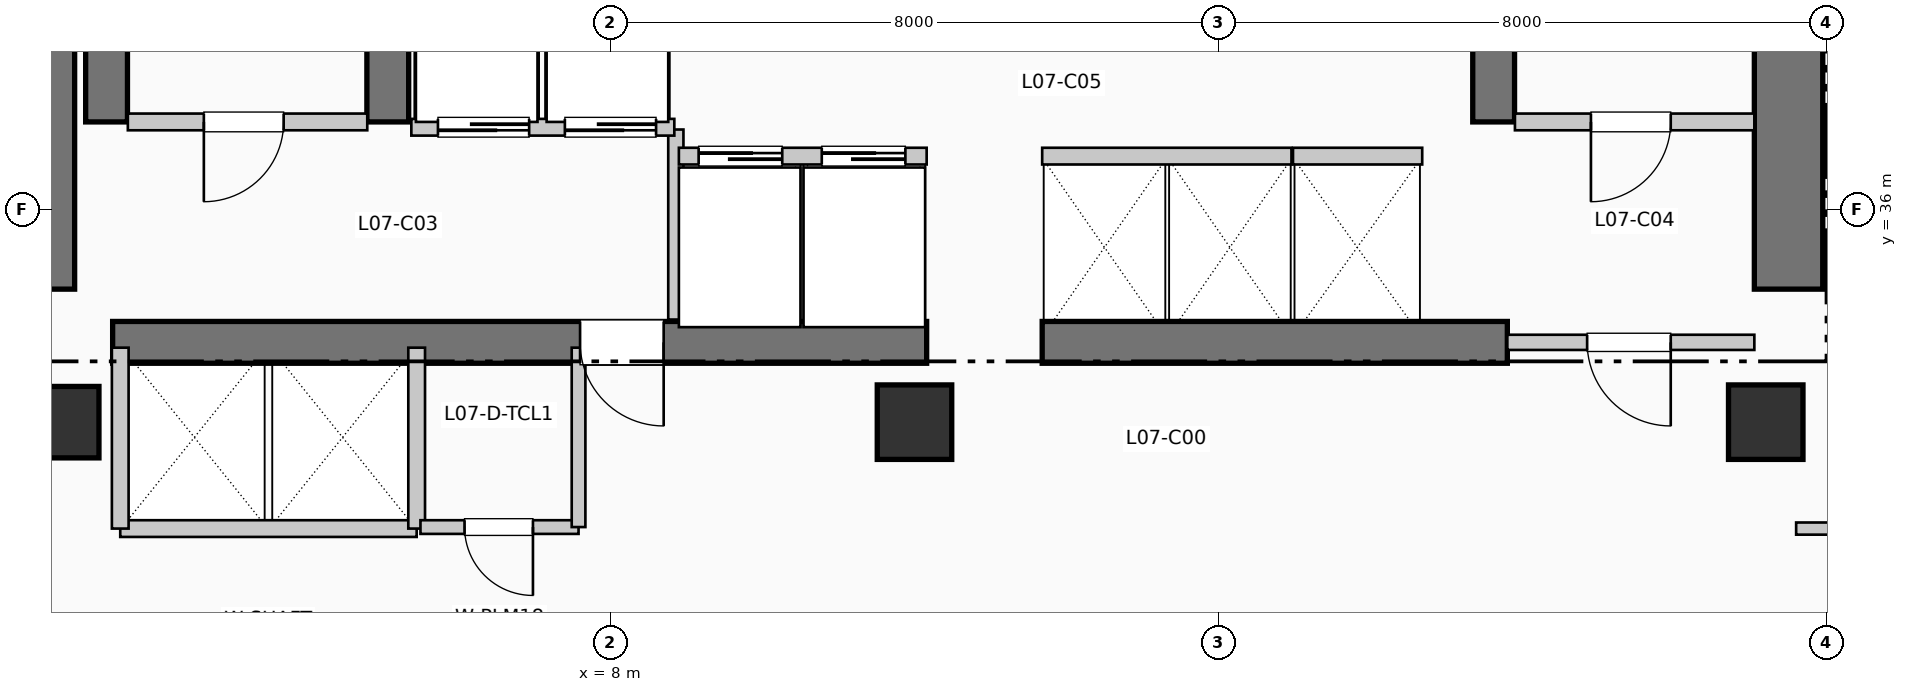
"""IFC4 building model, lengths in metres.
Left out: names, types, materials, properties, quantities, classifications, styles, units other than length and angle.
Written with IfcOpenShell. Run it as: python <this file> out.ifc"""

import sys

from ifc_helpers import new_model, si_unit, direction, frame, frame_2d, origin, origin_2d, place, context, subcontext, project, spatial, rectangle, extrude, element, fill, save


model = new_model("IFC4")
c1 = context("Model", 3, precision=1e-05, world=origin(), true_north=direction((0.0, 1.0)))
c2 = subcontext(c1, "Body", "Model", "MODEL_VIEW")
j1 = project(units=[si_unit("LENGTHUNIT", "METRE"), si_unit("PLANEANGLEUNIT", "RADIAN")], contexts=[c1])
p1 = place(None, origin())
s1 = spatial("IfcSite", under=j1, at=p1, CompositionType="ELEMENT")
p2 = place(p1, origin())
s2 = spatial("IfcBuilding", under=s1, at=p2, CompositionType="ELEMENT")
p3 = place(p2, frame((0.0, 0.0, 34.32)))
s3 = spatial("IfcBuildingStorey", under=s2, at=p3, CompositionType="ELEMENT", Elevation=34.32)
p4 = place(p3, frame((0.5, 34.95, 0.0), z_axis=(0.0, 0.0, 1.0), x_axis=(0.0, 1.0, 0.0)))
e1 = element("IfcWall", 1, at=p4, inside=s3, PredefinedType="SHEAR", context=c2, shape_type="SweptSolid", body=[
    extrude(rectangle(XDim=7.9, YDim=0.9, at=frame_2d((3.95, 0.0))), origin(), (0.0, 0.0, 1.0), 3.96),
])
p5 = place(p3, frame((23.5, 34.95, 0.0), z_axis=(0.0, 0.0, 1.0), x_axis=(0.0, 1.0, 0.0)))
e2 = element("IfcWall", 2, at=p5, inside=s3, PredefinedType="SHEAR", context=c2, shape_type="SweptSolid", body=[
    extrude(rectangle(XDim=10.64, YDim=0.9, at=frame_2d((5.32, 0.0))), origin(), (0.0, 0.0, 1.0), 3.96),
])
p6 = place(p3, frame((1.45, 34.25, 0.0), z_axis=(0.0, 0.0, 1.0), x_axis=(1.0, 0.0, 0.0)))
e3 = element("IfcWall", 3, at=p6, inside=s3, PredefinedType="SHEAR", context=c2, shape_type="SweptSolid", body=[
    extrude(rectangle(XDim=10.71, YDim=0.55, at=frame_2d((5.355, 0.0))), origin(), (0.0, 0.0, 1.0), 3.96),
])
p7 = place(p6, frame((7.25, 0.0, 0.0), z_axis=(0.0, 0.0, 1.0), x_axis=(-1.0, 0.0, 0.0)))
e4 = element("IfcOpeningElement", 4, at=p7, cuts=e3, PredefinedType="OPENING", context=c2, shape_type="SweptSolid", body=[
    extrude(rectangle(XDim=1.1, YDim=2.15, at=frame_2d((0.55, 1.075))), frame((0.0, 0.285, 0.0), z_axis=(0.0, -1.0, 0.0), x_axis=(1.0, 0.0, 0.0)), (0.0, 0.0, 1.0), 0.57),
])
p8 = place(p3, frame((13.68, 34.25, 0.0), z_axis=(0.0, 0.0, 1.0), x_axis=(1.0, 0.0, 0.0)))
e5 = element("IfcWall", 5, at=p8, inside=s3, PredefinedType="SHEAR", context=c2, shape_type="SweptSolid", body=[
    extrude(rectangle(XDim=6.12, YDim=0.55, at=frame_2d((3.06, 0.0))), origin(), (0.0, 0.0, 1.0), 3.96),
])
for number, where, z_axis, x_axis in (
    (6, (1.37, 37.15, 0.0), (0.0, 0.0, 1.0), (0.0, 1.0, 0.0)),
    (7, (5.07, 37.15, 0.0), (0.0, 0.0, 1.0), (0.0, 1.0, 0.0)),
    (8, (19.62, 37.15, 0.0), (0.0, 0.0, 1.0), (0.0, 1.0, 0.0)),
):
    element("IfcWall", number, at=place(p3, frame(where, z_axis=z_axis, x_axis=x_axis)), inside=s3, PredefinedType="SHEAR", context=c2, shape_type="SweptSolid", body=[
        extrude(rectangle(XDim=7.89, YDim=0.55, at=frame_2d((3.945, 0.0))), origin(), (0.0, 0.0, 1.0), 3.96),
    ])
p9 = place(p3, frame((0.8, 33.2, 0.0), z_axis=(0.0, 0.0, 1.0), x_axis=(1.0, 0.0, 0.0)))
e9 = element("IfcColumn", 9, at=p9, inside=s3, PredefinedType="COLUMN", context=c2, shape_type="SweptSolid", body=[
    extrude(rectangle(XDim=0.94, YDim=0.94, at=origin_2d()), origin(), (0.0, 0.0, 1.0), 3.96),
])
for number, where, z_axis, x_axis in (
    (10, (12.0, 33.2, 0.0), (0.0, 0.0, 1.0), (1.0, 0.0, 0.0)),
    (11, (23.2, 33.2, 0.0), (0.0, 0.0, 1.0), (1.0, 0.0, 0.0)),
):
    element("IfcColumn", number, at=place(p3, frame(where, z_axis=z_axis, x_axis=x_axis)), inside=s3, PredefinedType="COLUMN", context=c2, shape_type="SweptSolid", body=[
        extrude(rectangle(XDim=0.98, YDim=0.98, at=origin_2d()), origin(), (0.0, 0.0, 1.0), 3.96),
    ])
p10 = place(p3, frame((1.65, 37.15, 0.0), z_axis=(0.0, 0.0, 1.0), x_axis=(1.0, 0.0, 0.0)))
e12 = element("IfcWall", 12, at=p10, inside=s3, PredefinedType="PARTITIONING", context=c2, shape_type="SweptSolid", body=[
    extrude(rectangle(XDim=3.15, YDim=0.22, at=frame_2d((1.575, 0.0))), origin(), (0.0, 0.0, 1.0), 3.71),
])
p11 = place(p10, frame((2.05, 0.0, 0.0), z_axis=(0.0, 0.0, 1.0), x_axis=(-1.0, 0.0, 0.0)))
e13 = element("IfcOpeningElement", 13, at=p11, cuts=e12, PredefinedType="OPENING", context=c2, shape_type="SweptSolid", body=[
    extrude(rectangle(XDim=1.05, YDim=2.15, at=frame_2d((0.525, 1.075))), frame((0.0, 0.12, 0.0), z_axis=(0.0, -1.0, 0.0), x_axis=(1.0, 0.0, 0.0)), (0.0, 0.0, 1.0), 0.24),
])
p12 = place(p3, frame((8.86, 34.55, 0.0), z_axis=(0.0, 0.0, 1.0), x_axis=(0.0, 1.0, 0.0)))
e14 = element("IfcWall", 14, at=p12, inside=s3, PredefinedType="PARTITIONING", context=c2, shape_type="SweptSolid", body=[
    extrude(rectangle(XDim=2.5, YDim=0.2, at=frame_2d((1.25, 0.0))), origin(), (0.0, 0.0, 1.0), 3.71),
])
p13 = place(p3, frame((19.9, 37.15, 0.0), z_axis=(0.0, 0.0, 1.0), x_axis=(1.0, 0.0, 0.0)))
e15 = element("IfcWall", 15, at=p13, inside=s3, PredefinedType="PARTITIONING", context=c2, shape_type="SweptSolid", body=[
    extrude(rectangle(XDim=3.15, YDim=0.22, at=frame_2d((1.575, 0.0))), origin(), (0.0, 0.0, 1.0), 3.71),
])
p14 = place(p13, frame((2.05, 0.0, 0.0), z_axis=(0.0, 0.0, 1.0), x_axis=(-1.0, 0.0, 0.0)))
e16 = element("IfcOpeningElement", 16, at=p14, cuts=e15, PredefinedType="OPENING", context=c2, shape_type="SweptSolid", body=[
    extrude(rectangle(XDim=1.05, YDim=2.15, at=frame_2d((0.525, 1.075))), frame((0.0, 0.12, 0.0), z_axis=(0.0, -1.0, 0.0), x_axis=(1.0, 0.0, 0.0)), (0.0, 0.0, 1.0), 0.24),
])
p15 = place(p3, frame((19.8, 34.25, 0.0), z_axis=(0.0, 0.0, 1.0), x_axis=(1.0, 0.0, 0.0)))
e17 = element("IfcWall", 17, at=p15, inside=s3, PredefinedType="PARTITIONING", context=c2, shape_type="SweptSolid", body=[
    extrude(rectangle(XDim=3.25, YDim=0.2, at=frame_2d((1.625, 0.0))), origin(), (0.0, 0.0, 1.0), 3.71),
])
p16 = place(p15, frame((2.15, 0.0, 0.0), z_axis=(0.0, 0.0, 1.0), x_axis=(-1.0, 0.0, 0.0)))
e18 = element("IfcOpeningElement", 18, at=p16, cuts=e17, PredefinedType="OPENING", context=c2, shape_type="SweptSolid", body=[
    extrude(rectangle(XDim=1.1, YDim=2.15, at=frame_2d((0.55, 1.075))), frame((0.0, 0.11, 0.0), z_axis=(0.0, -1.0, 0.0), x_axis=(1.0, 0.0, 0.0)), (0.0, 0.0, 1.0), 0.22),
])
p17 = place(p3, frame((5.38, 37.08, 0.0), z_axis=(0.0, 0.0, 1.0), x_axis=(1.0, 0.0, 0.0)))
e19 = element("IfcWall", 19, at=p17, inside=s3, PredefinedType="PARTITIONING", context=c2, shape_type="SweptSolid", body=[
    extrude(rectangle(XDim=3.46, YDim=0.22, at=frame_2d((1.73, 0.0))), origin(), (0.0, 0.0, 1.0), 3.71),
])
p18 = place(p17, frame((1.55, 0.0, 0.0), z_axis=(0.0, 0.0, 1.0), x_axis=(-1.0, 0.0, 0.0)))
e20 = element("IfcOpeningElement", 20, at=p18, cuts=e19, PredefinedType="OPENING", context=c2, shape_type="SweptSolid", body=[
    extrude(rectangle(XDim=1.2, YDim=2.2, at=frame_2d((0.6, 1.1))), frame((0.0, 0.12, 0.0), z_axis=(0.0, -1.0, 0.0), x_axis=(1.0, 0.0, 0.0)), (0.0, 0.0, 1.0), 0.24),
])
p19 = place(p17, frame((3.22, 0.0, 0.0), z_axis=(0.0, 0.0, 1.0), x_axis=(-1.0, 0.0, 0.0)))
e21 = element("IfcOpeningElement", 21, at=p19, cuts=e19, PredefinedType="OPENING", context=c2, shape_type="SweptSolid", body=[
    extrude(rectangle(XDim=1.2, YDim=2.2, at=frame_2d((0.6, 1.1))), frame((0.0, 0.12, 0.0), z_axis=(0.0, -1.0, 0.0), x_axis=(1.0, 0.0, 0.0)), (0.0, 0.0, 1.0), 0.24),
])
p20 = place(p3, frame((1.55, 31.8, 0.0), z_axis=(0.0, 0.0, 1.0), x_axis=(1.0, 0.0, 0.0)))
e22 = element("IfcWall", 22, at=p20, inside=s3, PredefinedType="PARTITIONING", context=c2, shape_type="SweptSolid", body=[
    extrude(rectangle(XDim=3.9, YDim=0.22, at=frame_2d((1.95, 0.0))), origin(), (0.0, 0.0, 1.0), 3.71),
])
for number, where, z_axis, x_axis in (
    (23, (1.55, 31.8, 0.0), (0.0, 0.0, 1.0), (0.0, 1.0, 0.0)),
    (24, (5.45, 31.8, 0.0), (0.0, 0.0, 1.0), (0.0, 1.0, 0.0)),
):
    element("IfcWall", number, at=place(p3, frame(where, z_axis=z_axis, x_axis=x_axis)), inside=s3, PredefinedType="PARTITIONING", context=c2, shape_type="SweptSolid", body=[
        extrude(rectangle(XDim=2.38, YDim=0.22, at=frame_2d((1.19, 0.0))), origin(), (0.0, 0.0, 1.0), 3.71),
    ])
p21 = place(p3, frame((5.5, 31.82, 0.0), z_axis=(0.0, 0.0, 1.0), x_axis=(1.0, 0.0, 0.0)))
e25 = element("IfcWall", 25, at=p21, inside=s3, PredefinedType="PLUMBINGWALL", context=c2, shape_type="SweptSolid", body=[
    extrude(rectangle(XDim=2.08, YDim=0.18, at=frame_2d((1.04, 0.0))), origin(), (0.0, 0.0, 1.0), 3.71),
])
p22 = place(p21, frame((1.48, 0.0, 0.0), z_axis=(0.0, 0.0, 1.0), x_axis=(-1.0, 0.0, 0.0)))
e26 = element("IfcOpeningElement", 26, at=p22, cuts=e25, PredefinedType="OPENING", context=c2, shape_type="SweptSolid", body=[
    extrude(rectangle(XDim=0.9, YDim=2.1, at=frame_2d((0.45, 1.05))), frame((0.0, 0.1, 0.0), z_axis=(0.0, -1.0, 0.0), x_axis=(1.0, 0.0, 0.0)), (0.0, 0.0, 1.0), 0.2),
])
p23 = place(p3, frame((7.58, 31.82, 0.0), z_axis=(0.0, 0.0, 1.0), x_axis=(0.0, 1.0, 0.0)))
e27 = element("IfcWall", 27, at=p23, inside=s3, PredefinedType="PLUMBINGWALL", context=c2, shape_type="SweptSolid", body=[
    extrude(rectangle(XDim=2.36, YDim=0.18, at=frame_2d((1.18, 0.0))), origin(), (0.0, 0.0, 1.0), 3.71),
])
p24 = place(p3, frame((8.9, 36.7, 0.0), z_axis=(0.0, 0.0, 1.0), x_axis=(1.0, 0.0, 0.0)))
e28 = element("IfcWall", 28, at=p24, inside=s3, PredefinedType="PARTITIONING", context=c2, shape_type="SweptSolid", body=[
    extrude(rectangle(XDim=3.26, YDim=0.22, at=frame_2d((1.63, 0.0))), origin(), (0.0, 0.0, 1.0), 3.71),
])
p25 = place(p24, frame((0.26, 0.0, 0.0)))
e29 = element("IfcOpeningElement", 29, at=p25, cuts=e28, PredefinedType="OPENING", context=c2, shape_type="SweptSolid", body=[
    extrude(rectangle(XDim=1.1, YDim=2.2, at=frame_2d((0.55, 1.1))), frame((0.0, 0.12, 0.0), z_axis=(0.0, -1.0, 0.0), x_axis=(1.0, 0.0, 0.0)), (0.0, 0.0, 1.0), 0.24),
])
p26 = place(p24, frame((1.88, 0.0, 0.0)))
e30 = element("IfcOpeningElement", 30, at=p26, cuts=e28, PredefinedType="OPENING", context=c2, shape_type="SweptSolid", body=[
    extrude(rectangle(XDim=1.1, YDim=2.2, at=frame_2d((0.55, 1.1))), frame((0.0, 0.12, 0.0), z_axis=(0.0, -1.0, 0.0), x_axis=(1.0, 0.0, 0.0)), (0.0, 0.0, 1.0), 0.24),
])
p27 = place(p3, frame((13.68, 36.7, 0.0), z_axis=(0.0, 0.0, 1.0), x_axis=(1.0, 0.0, 0.0)))
e31 = element("IfcWall", 31, at=p27, inside=s3, PredefinedType="PARTITIONING", context=c2, shape_type="SweptSolid", body=[
    extrude(rectangle(XDim=3.28, YDim=0.22, at=frame_2d((1.64, 0.0))), origin(), (0.0, 0.0, 1.0), 3.71),
])
p28 = place(p3, frame((16.98, 36.7, 0.0), z_axis=(0.0, 0.0, 1.0), x_axis=(1.0, 0.0, 0.0)))
e32 = element("IfcWall", 32, at=p28, inside=s3, PredefinedType="PARTITIONING", context=c2, shape_type="SweptSolid", body=[
    extrude(rectangle(XDim=1.7, YDim=0.22, at=frame_2d((0.85, 0.0))), origin(), (0.0, 0.0, 1.0), 3.71),
])
p29 = place(p3, frame((23.6, 31.8, 0.0), z_axis=(0.0, 0.0, 1.0), x_axis=(1.0, 0.0, 0.0)))
e33 = element("IfcWall", 33, at=p29, inside=s3, PredefinedType="PARTITIONING", context=c2, shape_type="SweptSolid", body=[
    extrude(rectangle(XDim=32.21, YDim=0.16, at=frame_2d((16.105, 0.0))), origin(), (0.0, 0.0, 1.0), 3.71),
])
p30 = place(p29, frame((8.577, 0.0, 0.0)))
e34 = element("IfcOpeningElement", 34, at=p30, cuts=e33, PredefinedType="OPENING", context=c2, shape_type="SweptSolid", body=[
    extrude(rectangle(XDim=0.95, YDim=2.15, at=frame_2d((0.475, 1.075))), frame((0.0, 0.09, 0.0), z_axis=(0.0, -1.0, 0.0), x_axis=(1.0, 0.0, 0.0)), (0.0, 0.0, 1.0), 0.18),
])
p31 = place(p29, frame((23.683, 0.0, 0.0)))
e35 = element("IfcOpeningElement", 35, at=p31, cuts=e33, PredefinedType="OPENING", context=c2, shape_type="SweptSolid", body=[
    extrude(rectangle(XDim=0.95, YDim=2.15, at=frame_2d((0.475, 1.075))), frame((0.0, 0.09, 0.0), z_axis=(0.0, -1.0, 0.0), x_axis=(1.0, 0.0, 0.0)), (0.0, 0.0, 1.0), 0.18),
])
p32 = place(p11, origin())
e36 = element("IfcDoor", 36, at=p32, inside=s3, OperationType="SINGLE_SWING_LEFT", PredefinedType="DOOR", context=c2, shape_type="SweptSolid", body=[
    extrude(rectangle(XDim=1.05, YDim=2.15, at=frame_2d((0.525, 1.075))), frame((0.0, 0.025, 0.0), z_axis=(0.0, -1.0, 0.0), x_axis=(1.0, 0.0, 0.0)), (0.0, 0.0, 1.0), 0.05),
])
fill(e13, e36)
p33 = place(p7, origin())
e37 = element("IfcDoor", 37, at=p33, inside=s3, OperationType="SINGLE_SWING_RIGHT", PredefinedType="DOOR", context=c2, shape_type="SweptSolid", body=[
    extrude(rectangle(XDim=1.1, YDim=2.15, at=frame_2d((0.55, 1.075))), frame((0.0, 0.025, 0.0), z_axis=(0.0, -1.0, 0.0), x_axis=(1.0, 0.0, 0.0)), (0.0, 0.0, 1.0), 0.05),
])
fill(e4, e37)
p34 = place(p14, origin())
e38 = element("IfcDoor", 38, at=p34, inside=s3, OperationType="SINGLE_SWING_LEFT", PredefinedType="DOOR", context=c2, shape_type="SweptSolid", body=[
    extrude(rectangle(XDim=1.05, YDim=2.15, at=frame_2d((0.525, 1.075))), frame((0.0, 0.025, 0.0), z_axis=(0.0, -1.0, 0.0), x_axis=(1.0, 0.0, 0.0)), (0.0, 0.0, 1.0), 0.05),
])
fill(e16, e38)
p35 = place(p16, origin())
e39 = element("IfcDoor", 39, at=p35, inside=s3, OperationType="SINGLE_SWING_RIGHT", PredefinedType="DOOR", context=c2, shape_type="SweptSolid", body=[
    extrude(rectangle(XDim=1.1, YDim=2.15, at=frame_2d((0.55, 1.075))), frame((0.0, 0.025, 0.0), z_axis=(0.0, -1.0, 0.0), x_axis=(1.0, 0.0, 0.0)), (0.0, 0.0, 1.0), 0.05),
])
fill(e18, e39)
p36 = place(p18, origin())
e40 = element("IfcDoor", 40, at=p36, inside=s3, OperationType="SLIDING_TO_RIGHT", PredefinedType="DOOR", context=c2, shape_type="SweptSolid", body=[
    extrude(rectangle(XDim=1.2, YDim=2.2, at=frame_2d((0.6, 1.1))), frame((0.0, 0.025, 0.0), z_axis=(0.0, -1.0, 0.0), x_axis=(1.0, 0.0, 0.0)), (0.0, 0.0, 1.0), 0.05),
])
fill(e20, e40)
p37 = place(p19, origin())
e41 = element("IfcDoor", 41, at=p37, inside=s3, OperationType="SLIDING_TO_RIGHT", PredefinedType="DOOR", context=c2, shape_type="SweptSolid", body=[
    extrude(rectangle(XDim=1.2, YDim=2.2, at=frame_2d((0.6, 1.1))), frame((0.0, 0.025, 0.0), z_axis=(0.0, -1.0, 0.0), x_axis=(1.0, 0.0, 0.0)), (0.0, 0.0, 1.0), 0.05),
])
fill(e21, e41)
p38 = place(p22, origin())
e42 = element("IfcDoor", 42, at=p38, inside=s3, OperationType="SINGLE_SWING_RIGHT", PredefinedType="DOOR", context=c2, shape_type="SweptSolid", body=[
    extrude(rectangle(XDim=0.9, YDim=2.1, at=frame_2d((0.45, 1.05))), frame((0.0, 0.025, 0.0), z_axis=(0.0, -1.0, 0.0), x_axis=(1.0, 0.0, 0.0)), (0.0, 0.0, 1.0), 0.05),
])
fill(e26, e42)
p39 = place(p25, origin())
e43 = element("IfcDoor", 43, at=p39, inside=s3, OperationType="SLIDING_TO_LEFT", PredefinedType="DOOR", context=c2, shape_type="SweptSolid", body=[
    extrude(rectangle(XDim=1.1, YDim=2.2, at=frame_2d((0.55, 1.1))), frame((0.0, 0.025, 0.0), z_axis=(0.0, -1.0, 0.0), x_axis=(1.0, 0.0, 0.0)), (0.0, 0.0, 1.0), 0.05),
])
fill(e29, e43)
p40 = place(p26, origin())
e44 = element("IfcDoor", 44, at=p40, inside=s3, OperationType="SLIDING_TO_LEFT", PredefinedType="DOOR", context=c2, shape_type="SweptSolid", body=[
    extrude(rectangle(XDim=1.1, YDim=2.2, at=frame_2d((0.55, 1.1))), frame((0.0, 0.025, 0.0), z_axis=(0.0, -1.0, 0.0), x_axis=(1.0, 0.0, 0.0)), (0.0, 0.0, 1.0), 0.05),
])
fill(e30, e44)
save(model, sys.argv[1])
